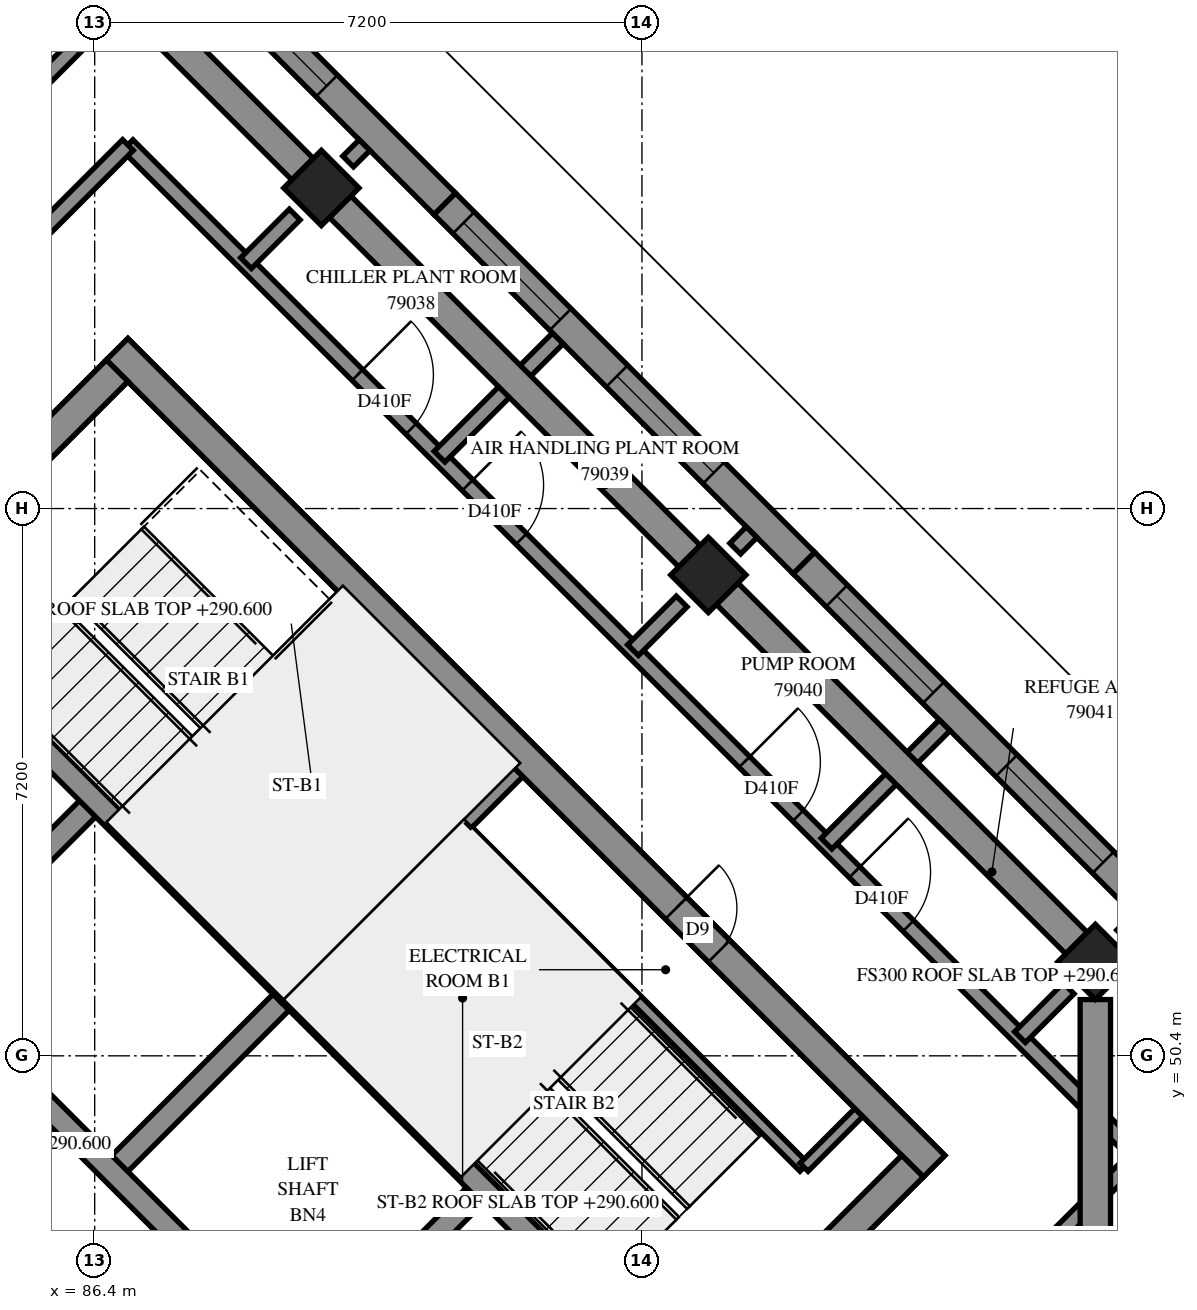
"""IFC4 building model, lengths in metres.
Left out: names, types, materials, properties, quantities, classifications, styles, units other than length and angle.
Written with IfcOpenShell. Run it as: python <this file> out.ifc"""

import sys

from ifc_helpers import new_model, si_unit, direction, frame, frame_2d, origin, origin_2d, place, context, subcontext, project, spatial, polyline, rectangle, outline, extrude, element, fill, save


model = new_model("IFC4")
c1 = context("Model", 3, precision=1e-05, world=origin(), true_north=direction((0.0, 1.0)))
c2 = subcontext(c1, "Body", "Model", "MODEL_VIEW")
j1 = project(units=[si_unit("LENGTHUNIT", "METRE"), si_unit("PLANEANGLEUNIT", "RADIAN")], contexts=[c1])
p1 = place(None, origin())
s1 = spatial("IfcSite", under=j1, at=p1, CompositionType="ELEMENT")
p2 = place(p1, origin())
s2 = spatial("IfcBuilding", under=s1, at=p2, CompositionType="ELEMENT")
p3 = place(p2, frame((0.0, 0.0, 290.6)))
s3 = spatial("IfcBuildingStorey", under=s2, at=p3, CompositionType="ELEMENT", Elevation=290.6)
for number, where, z_axis, x_axis in (
    (1, (89.382, 61.818, 0.0), (0.0, 0.0, 1.0), (0.707, -0.707, 0.0)),
    (2, (94.474, 56.727, 0.0), (0.0, 0.0, 1.0), (0.707, -0.707, 0.0)),
    (3, (99.565, 51.635, 0.0), (0.0, 0.0, 1.0), (0.707, -0.707, 0.0)),
):
    element("IfcColumn", number, at=place(p3, frame(where, z_axis=z_axis, x_axis=x_axis)), inside=s3, PredefinedType="COLUMN", context=c2, shape_type="SweptSolid", body=[
        extrude(rectangle(XDim=0.7, YDim=0.7, at=origin_2d()), origin(), (0.0, 0.0, 1.0), 3.5),
    ])
p4 = place(p3, frame((76.23, 49.231, -0.3), z_axis=(0.0, 0.0, 1.0), x_axis=(0.7071034917, -0.7071100706, 0.0)))
e4 = element("IfcWall", 4, at=p4, inside=s3, PredefinedType="SHEAR", context=c2, shape_type="SweptSolid", body=[
    extrude(rectangle(XDim=15.2, YDim=0.4, at=frame_2d((7.6, 0.0))), origin(), (0.0, 0.0, 1.0), 3.1),
])
p5 = place(p3, frame((86.695, 59.696, -0.3), z_axis=(0.0, 0.0, 1.0), x_axis=(0.7071100706, -0.7071034917, 0.0)))
e5 = element("IfcWall", 5, at=p5, inside=s3, PredefinedType="SHEAR", context=c2, shape_type="SweptSolid", body=[
    extrude(rectangle(XDim=15.2, YDim=0.4, at=frame_2d((7.6, 0.0))), origin(), (0.0, 0.0, 1.0), 3.1),
])
p6 = place(p5, frame((10.4, 0.0, 0.3)))
e6 = element("IfcOpeningElement", 6, at=p6, cuts=e5, PredefinedType="OPENING", context=c2, shape_type="SweptSolid", body=[
    extrude(rectangle(XDim=0.8, YDim=2.1, at=frame_2d((0.4, 1.05))), frame((0.0, 0.21, 0.0), z_axis=(0.0, -1.0, 0.0), x_axis=(1.0, 0.0, 0.0)), (0.0, 0.0, 1.0), 0.42),
])
p7 = place(p3, frame((76.513, 49.231, -0.3), z_axis=(0.0, 0.0, 1.0), x_axis=(0.7071067812, 0.7071067812, 0.0)))
e7 = element("IfcWall", 7, at=p7, inside=s3, PredefinedType="SHEAR", context=c2, shape_type="SweptSolid", body=[
    extrude(rectangle(XDim=14.4, YDim=0.4, at=frame_2d((7.2, 0.0))), origin(), (0.0, 0.0, 1.0), 3.1),
])
p8 = place(p7, frame((4.55, 0.0, 0.3)))
e8 = element("IfcOpeningElement", 8, at=p8, cuts=e7, PredefinedType="OPENING", context=c2, shape_type="SweptSolid", body=[
    extrude(rectangle(XDim=1.1, YDim=2.1, at=frame_2d((0.55, 1.05))), frame((0.0, 0.21, 0.0), z_axis=(0.0, -1.0, 0.0), x_axis=(1.0, 0.0, 0.0)), (0.0, 0.0, 1.0), 0.42),
])
p9 = place(p7, frame((11.35, 0.0, 0.3)))
e9 = element("IfcOpeningElement", 9, at=p9, cuts=e7, PredefinedType="OPENING", context=c2, shape_type="SweptSolid", body=[
    extrude(rectangle(XDim=1.1, YDim=2.1, at=frame_2d((0.55, 1.05))), frame((0.0, 0.21, 0.0), z_axis=(0.0, -1.0, 0.0), x_axis=(1.0, 0.0, 0.0)), (0.0, 0.0, 1.0), 0.42),
])
p10 = place(p3, frame((86.978, 38.766, -0.3), z_axis=(0.0, 0.0, 1.0), x_axis=(0.7071067812, 0.7071067812, 0.0)))
e10 = element("IfcWall", 10, at=p10, inside=s3, PredefinedType="SHEAR", context=c2, shape_type="SweptSolid", body=[
    extrude(rectangle(XDim=14.4, YDim=0.4, at=frame_2d((7.2, 0.0))), origin(), (0.0, 0.0, 1.0), 3.1),
])
p11 = place(p10, frame((4.55, 0.0, 0.3)))
e11 = element("IfcOpeningElement", 11, at=p11, cuts=e10, PredefinedType="OPENING", context=c2, shape_type="SweptSolid", body=[
    extrude(rectangle(XDim=1.1, YDim=2.1, at=frame_2d((0.55, 1.05))), frame((0.0, 0.21, 0.0), z_axis=(0.0, -1.0, 0.0), x_axis=(1.0, 0.0, 0.0)), (0.0, 0.0, 1.0), 0.42),
])
p12 = place(p10, frame((11.35, 0.0, 0.3)))
e12 = element("IfcOpeningElement", 12, at=p12, cuts=e10, PredefinedType="OPENING", context=c2, shape_type="SweptSolid", body=[
    extrude(rectangle(XDim=1.1, YDim=2.1, at=frame_2d((0.55, 1.05))), frame((0.0, 0.21, 0.0), z_axis=(0.0, -1.0, 0.0), x_axis=(1.0, 0.0, 0.0)), (0.0, 0.0, 1.0), 0.42),
])
p13 = place(p3, frame((84.079, 51.423, 0.0), z_axis=(0.0, 0.0, 1.0), x_axis=(0.7071219326, 0.7070916295, 0.0)))
e13 = element("IfcWall", 13, at=p13, inside=s3, PredefinedType="SOLIDWALL", context=c2, shape_type="SweptSolid", body=[
    extrude(rectangle(XDim=3.3, YDim=0.3, at=frame_2d((1.65, 0.0))), origin(), (0.0, 0.0, 1.0), 3.5),
])
for number, where, z_axis, x_axis in (
    (14, (86.625, 48.878, 0.0), (0.0, 0.0, 1.0), (0.707, 0.707, 0.0)),
    (15, (89.17, 46.332, 0.0), (0.0, 0.0, 1.0), (0.707, 0.707, 0.0)),
):
    element("IfcWall", number, at=place(p3, frame(where, z_axis=z_axis, x_axis=x_axis)), inside=s3, PredefinedType="SOLIDWALL", context=c2, shape_type="SweptSolid", body=[
        extrude(rectangle(XDim=3.3, YDim=0.3, at=frame_2d((1.65, 0.0))), origin(), (0.0, 0.0, 1.0), 3.5),
    ])
p14 = place(p3, frame((78.988, 51.423, 0.0), z_axis=(0.0, 0.0, 1.0), x_axis=(0.7071067812, -0.7071067812, 0.0)))
e16 = element("IfcWall", 16, at=p14, inside=s3, PredefinedType="SOLIDWALL", context=c2, shape_type="SweptSolid", body=[
    extrude(rectangle(XDim=14.4, YDim=0.3, at=frame_2d((7.2, 0.0))), origin(), (0.0, 0.0, 1.0), 3.5),
])
p15 = place(p14, frame((12.05, 0.0, 0.0)))
e17 = element("IfcOpeningElement", 17, at=p15, cuts=e16, PredefinedType="OPENING", context=c2, shape_type="SweptSolid", body=[
    extrude(rectangle(XDim=1.1, YDim=2.1, at=frame_2d((0.55, 1.05))), frame((0.0, 0.16, 0.0), z_axis=(0.0, -1.0, 0.0), x_axis=(1.0, 0.0, 0.0)), (0.0, 0.0, 1.0), 0.32),
])
p16 = place(p3, frame((81.534, 53.969, 0.0), z_axis=(0.0, 0.0, 1.0), x_axis=(0.707103309, -0.7071102534, 0.0)))
e18 = element("IfcWall", 18, at=p16, inside=s3, PredefinedType="SOLIDWALL", context=c2, shape_type="SweptSolid", body=[
    extrude(rectangle(XDim=14.4, YDim=0.3, at=frame_2d((7.2, 0.0))), origin(), (0.0, 0.0, 1.0), 3.5),
])
p17 = place(p16, frame((12.05, 0.0, 0.0)))
e19 = element("IfcOpeningElement", 19, at=p17, cuts=e18, PredefinedType="OPENING", context=c2, shape_type="SweptSolid", body=[
    extrude(rectangle(XDim=1.1, YDim=2.1, at=frame_2d((0.55, 1.05))), frame((0.0, 0.16, 0.0), z_axis=(0.0, -1.0, 0.0), x_axis=(1.0, 0.0, 0.0)), (0.0, 0.0, 1.0), 0.32),
])
for number, where, z_axis, x_axis in (
    (20, (83.867, 56.302, 0.0), (0.0, 0.0, 1.0), (0.707, -0.707, 0.0)),
    (21, (88.958, 51.211, 0.0), (0.0, 0.0, 1.0), (0.707, -0.707, 0.0)),
):
    element("IfcWall", number, at=place(p3, frame(where, z_axis=z_axis, x_axis=x_axis)), inside=s3, PredefinedType="SOLIDWALL", context=c2, shape_type="SweptSolid", body=[
        extrude(rectangle(XDim=7.2, YDim=0.3, at=frame_2d((3.6, 0.0))), origin(), (0.0, 0.0, 1.0), 3.5),
    ])
p18 = place(p3, frame((88.958, 51.211, 0.0), z_axis=(0.0, 0.0, 1.0), x_axis=(0.7071067812, 0.7071067812, 0.0)))
e22 = element("IfcWall", 22, at=p18, inside=s3, PredefinedType="SOLIDWALL", context=c2, shape_type="SweptSolid", body=[
    extrude(rectangle(XDim=4.2, YDim=0.3, at=frame_2d((2.1, 0.0))), origin(), (0.0, 0.0, 1.0), 3.5),
])
p19 = place(p3, frame((99.282, 46.544, 0.0), z_axis=(0.0, 0.0, 1.0), x_axis=(0.7071067812, 0.7071067812, 0.0)))
e23 = element("IfcWall", 23, at=p19, inside=s3, PredefinedType="SOLIDWALL", context=c2, shape_type="SweptSolid", body=[
    extrude(outline(polyline([(0.2, -0.2), (6.23, -0.2), (5.657, 0.2), (-0.2, 0.2), (0.2, -0.2)])), origin(), (0.0, 0.0, 1.0), 3.5),
])
p20 = place(p19, frame((1.1, 0.0, 0.7)))
e24 = element("IfcOpeningElement", 24, at=p20, cuts=e23, PredefinedType="OPENING", context=c2, shape_type="SweptSolid", body=[
    extrude(rectangle(XDim=1.8, YDim=2.2, at=frame_2d((0.9, 1.1))), frame((0.0, 0.21, 0.0), z_axis=(0.0, -1.0, 0.0), x_axis=(1.0, 0.0, 0.0)), (0.0, 0.0, 1.0), 0.42),
])
p21 = place(p3, frame((100.48, 52.134, 0.0), z_axis=(0.0, 0.0, 1.0), x_axis=(-0.7071067812, 0.7071067812, 0.0)))
e25 = element("IfcWall", 25, at=p21, inside=s3, PredefinedType="SOLIDWALL", context=c2, shape_type="SweptSolid", body=[
    extrude(outline(polyline([(0.036, -0.2), (6.718, -0.2), (6.718, 0.2), (-0.036, 0.2), (0.036, -0.2)])), origin(), (0.0, 0.0, 1.0), 3.5),
])
p22 = place(p21, frame((1.147, 0.0, 0.7)))
e26 = element("IfcOpeningElement", 26, at=p22, cuts=e25, PredefinedType="OPENING", context=c2, shape_type="SweptSolid", body=[
    extrude(rectangle(XDim=1.8, YDim=2.2, at=frame_2d((0.9, 1.1))), frame((0.0, 0.21, 0.0), z_axis=(0.0, -1.0, 0.0), x_axis=(1.0, 0.0, 0.0)), (0.0, 0.0, 1.0), 0.42),
])
p23 = place(p21, frame((4.306, 0.0, 0.7)))
e27 = element("IfcOpeningElement", 27, at=p23, cuts=e25, PredefinedType="OPENING", context=c2, shape_type="SweptSolid", body=[
    extrude(rectangle(XDim=1.8, YDim=2.2, at=frame_2d((0.9, 1.1))), frame((0.0, 0.21, 0.0), z_axis=(0.0, -1.0, 0.0), x_axis=(1.0, 0.0, 0.0)), (0.0, 0.0, 1.0), 0.42),
])
p24 = place(p3, frame((95.73, 56.884, 0.0), z_axis=(0.0, 0.0, 1.0), x_axis=(-0.7071067812, 0.7071067812, 0.0)))
e28 = element("IfcWall", 28, at=p24, inside=s3, PredefinedType="SOLIDWALL", context=c2, shape_type="SweptSolid", body=[
    extrude(outline(polyline([(0.0, -0.2), (6.682, -0.2), (6.682, 0.2), (0.0, 0.2), (0.0, -0.2)])), origin(), (0.0, 0.0, 1.0), 3.5),
])
p25 = place(p24, frame((1.677, 0.0, 0.7)))
e29 = element("IfcOpeningElement", 29, at=p25, cuts=e28, PredefinedType="OPENING", context=c2, shape_type="SweptSolid", body=[
    extrude(rectangle(XDim=1.8, YDim=2.2, at=frame_2d((0.9, 1.1))), frame((0.0, 0.21, 0.0), z_axis=(0.0, -1.0, 0.0), x_axis=(1.0, 0.0, 0.0)), (0.0, 0.0, 1.0), 0.42),
])
p26 = place(p24, frame((4.529, 0.0, 0.7)))
e30 = element("IfcOpeningElement", 30, at=p26, cuts=e28, PredefinedType="OPENING", context=c2, shape_type="SweptSolid", body=[
    extrude(rectangle(XDim=1.8, YDim=2.2, at=frame_2d((0.9, 1.1))), frame((0.0, 0.21, 0.0), z_axis=(0.0, -1.0, 0.0), x_axis=(1.0, 0.0, 0.0)), (0.0, 0.0, 1.0), 0.42),
])
p27 = place(p3, frame((91.005, 61.609, 0.0), z_axis=(0.0, 0.0, 1.0), x_axis=(-0.7071142638, 0.7070992985, 0.0)))
e31 = element("IfcWall", 31, at=p27, inside=s3, PredefinedType="SOLIDWALL", context=c2, shape_type="SweptSolid", body=[
    extrude(outline(polyline([(0.0, -0.2), (6.682, -0.2), (6.682, 0.2), (0.0, 0.2), (0.0, -0.2)])), origin(), (0.0, 0.0, 1.0), 3.5),
])
p28 = place(p27, frame((2.195, 0.0, 0.7)))
e32 = element("IfcOpeningElement", 32, at=p28, cuts=e31, PredefinedType="OPENING", context=c2, shape_type="SweptSolid", body=[
    extrude(rectangle(XDim=1.8, YDim=2.2, at=frame_2d((0.9, 1.1))), frame((0.0, 0.21, 0.0), z_axis=(0.0, -1.0, 0.0), x_axis=(1.0, 0.0, 0.0)), (0.0, 0.0, 1.0), 0.42),
])
p29 = place(p3, frame((91.313, 53.354, 0.0), z_axis=(0.0, 0.0, 1.0), x_axis=(0.7071147811, -0.7070987812, 0.0)))
e33 = element("IfcWall", 33, at=p29, inside=s3, PredefinedType="PARTITIONING", context=c2, shape_type="SweptSolid", body=[
    extrude(rectangle(XDim=6.25, YDim=0.15, at=frame_2d((3.125, 0.0))), origin(), (0.0, 0.0, 1.0), 3.5),
])
p30 = place(p3, frame((95.732, 48.934, 0.0), z_axis=(0.0, 0.0, 1.0), x_axis=(0.7071067812, 0.7071067812, 0.0)))
e34 = element("IfcWall", 34, at=p30, inside=s3, PredefinedType="PARTITIONING", context=c2, shape_type="SweptSolid", body=[
    extrude(rectangle(XDim=1.02, YDim=0.15, at=frame_2d((0.51, 0.0))), origin(), (0.0, 0.0, 1.0), 3.5),
])
p31 = place(p3, frame((86.833, 62.381, 0.0), z_axis=(0.0, 0.0, 1.0), x_axis=(0.7071067812, -0.7071067812, 0.0)))
e35 = element("IfcWall", 35, at=p31, inside=s3, PredefinedType="PARTITIONING", context=c2, shape_type="SweptSolid", body=[
    extrude(rectangle(XDim=18.801, YDim=0.2, at=frame_2d((9.4, 0.0))), origin(), (0.0, 0.0, 1.0), 3.5),
])
p32 = place(p31, frame((4.276, 0.0, 0.0)))
e36 = element("IfcOpeningElement", 36, at=p32, cuts=e35, PredefinedType="OPENING", context=c2, shape_type="SweptSolid", body=[
    extrude(rectangle(XDim=1.0, YDim=2.1, at=frame_2d((0.5, 1.05))), frame((0.0, 0.11, 0.0), z_axis=(0.0, -1.0, 0.0), x_axis=(1.0, 0.0, 0.0)), (0.0, 0.0, 1.0), 0.22),
])
p33 = place(p31, frame((6.326, 0.0, 0.0)))
e37 = element("IfcOpeningElement", 37, at=p33, cuts=e35, PredefinedType="OPENING", context=c2, shape_type="SweptSolid", body=[
    extrude(rectangle(XDim=1.0, YDim=2.1, at=frame_2d((0.5, 1.05))), frame((0.0, 0.11, 0.0), z_axis=(0.0, -1.0, 0.0), x_axis=(1.0, 0.0, 0.0)), (0.0, 0.0, 1.0), 0.22),
])
p34 = place(p31, frame((11.476, 0.0, 0.0)))
e38 = element("IfcOpeningElement", 38, at=p34, cuts=e35, PredefinedType="OPENING", context=c2, shape_type="SweptSolid", body=[
    extrude(rectangle(XDim=1.0, YDim=2.1, at=frame_2d((0.5, 1.05))), frame((0.0, 0.11, 0.0), z_axis=(0.0, -1.0, 0.0), x_axis=(1.0, 0.0, 0.0)), (0.0, 0.0, 1.0), 0.22),
])
p35 = place(p31, frame((13.526, 0.0, 0.0)))
e39 = element("IfcOpeningElement", 39, at=p35, cuts=e35, PredefinedType="OPENING", context=c2, shape_type="SweptSolid", body=[
    extrude(rectangle(XDim=1.0, YDim=2.1, at=frame_2d((0.5, 1.05))), frame((0.0, 0.11, 0.0), z_axis=(0.0, -1.0, 0.0), x_axis=(1.0, 0.0, 0.0)), (0.0, 0.0, 1.0), 0.22),
])
p36 = place(p3, frame((94.12, 43.081, 0.0), z_axis=(0.0, 0.0, 1.0), x_axis=(0.7071067812, 0.7071067812, 0.0)))
e40 = element("IfcWall", 40, at=p36, inside=s3, PredefinedType="PARTITIONING", context=c2, shape_type="SweptSolid", body=[
    extrude(rectangle(XDim=8.499, YDim=0.2, at=frame_2d((4.25, 0.0))), origin(), (0.0, 0.0, 1.0), 3.5),
])
p37 = place(p3, frame((80.83, 56.372, 0.0), z_axis=(0.0, 0.0, 1.0), x_axis=(0.7069890968, 0.707224446, 0.0)))
e41 = element("IfcWall", 41, at=p37, inside=s3, PredefinedType="PARTITIONING", context=c2, shape_type="SweptSolid", body=[
    extrude(rectangle(XDim=8.498, YDim=0.2, at=frame_2d((4.249, 0.0))), origin(), (0.0, 0.0, 1.0), 3.5),
])
p38 = place(p37, frame((0.841, 0.0, 0.0)))
e42 = element("IfcOpeningElement", 42, at=p38, cuts=e41, PredefinedType="OPENING", context=c2, shape_type="SweptSolid", body=[
    extrude(rectangle(XDim=1.0, YDim=2.1, at=frame_2d((0.5, 1.05))), frame((0.0, 0.11, 0.0), z_axis=(0.0, -1.0, 0.0), x_axis=(1.0, 0.0, 0.0)), (0.0, 0.0, 1.0), 0.22),
])
for number, where, z_axis, x_axis in (
    (43, (98.574, 50.646, 0.0), (0.0, 0.0, 1.0), (0.707, 0.707, 0.0)),
    (44, (88.391, 60.828, 0.0), (0.0, 0.0, 1.0), (0.707, 0.707, 0.0)),
    (45, (93.483, 55.737, 0.0), (0.0, 0.0, 1.0), (0.707, 0.707, 0.0)),
):
    element("IfcWall", number, at=place(p3, frame(where, z_axis=z_axis, x_axis=x_axis)), inside=s3, PredefinedType="PARTITIONING", context=c2, shape_type="SweptSolid", body=[
        extrude(rectangle(XDim=0.905, YDim=0.2, at=frame_2d((0.453, 0.0))), origin(), (0.0, 0.0, 1.0), 3.5),
    ])
p39 = place(p3, frame((80.799, 58.327, 0.0), z_axis=(0.0, 0.0, 1.0), x_axis=(0.7071067812, 0.7071067812, 0.0)))
e46 = element("IfcWall", 46, at=p39, inside=s3, PredefinedType="PARTITIONING", context=c2, shape_type="SweptSolid", body=[
    extrude(outline(polyline([(0.0, -0.1), (9.338, -0.1), (9.338, 0.1), (0.0, 0.1), (0.0, -0.1)])), origin(), (0.0, 0.0, 1.0), 3.5),
])
for number, where, z_axis, x_axis in (
    (47, (96.028, 53.192, 0.0), (0.0, 0.0, 1.0), (0.707, 0.708, 0.0)),
    (48, (90.937, 58.283, 0.0), (0.0, 0.0, 1.0), (0.707, 0.707, 0.0)),
):
    element("IfcWall", number, at=place(p3, frame(where, z_axis=z_axis, x_axis=x_axis)), inside=s3, PredefinedType="PARTITIONING", context=c2, shape_type="SweptSolid", body=[
        extrude(outline(polyline([(0.0, -0.1), (2.2, -0.1), (2.2, 0.1), (0.0, 0.1), (0.0, -0.1)])), origin(), (0.0, 0.0, 1.0), 3.5),
    ])
p40 = place(p3, frame((99.917, 51.983, 0.0), z_axis=(0.0, 0.0, 1.0), x_axis=(0.7087439748, 0.7054657881, 0.0)))
e49 = element("IfcWall", 49, at=p40, inside=s3, PredefinedType="PARTITIONING", context=c2, shape_type="SweptSolid", body=[
    extrude(outline(polyline([(0.0, -0.1), (0.305, -0.1), (0.305, 0.1), (0.0, 0.1), (0.0, -0.1)])), origin(), (0.0, 0.0, 1.0), 3.5),
])
p41 = place(p3, frame((94.827, 57.073, 0.0), z_axis=(0.0, 0.0, 1.0), x_axis=(0.7053010617, 0.7089079012, 0.0)))
e50 = element("IfcWall", 50, at=p41, inside=s3, PredefinedType="PARTITIONING", context=c2, shape_type="SweptSolid", body=[
    extrude(outline(polyline([(0.0, -0.1), (0.305, -0.1), (0.305, 0.1), (0.0, 0.1), (0.0, -0.1)])), origin(), (0.0, 0.0, 1.0), 3.5),
])
p42 = place(p3, frame((89.734, 62.166, 0.0), z_axis=(0.0, 0.0, 1.0), x_axis=(0.7089070674, 0.7053018997, 0.0)))
e51 = element("IfcWall", 51, at=p42, inside=s3, PredefinedType="PARTITIONING", context=c2, shape_type="SweptSolid", body=[
    extrude(outline(polyline([(0.0, -0.1), (0.305, -0.1), (0.305, 0.1), (0.0, 0.1), (0.0, -0.1)])), origin(), (0.0, 0.0, 1.0), 3.5),
])
p43 = place(p22, origin())
e52 = element("IfcWindow", 52, at=p43, inside=s3, PartitioningType="SINGLE_PANEL", PredefinedType="WINDOW", context=c2, shape_type="SweptSolid", body=[
    extrude(rectangle(XDim=1.8, YDim=2.2, at=frame_2d((0.9, 1.1))), frame((0.0, 0.08, 0.0), z_axis=(0.0, -1.0, 0.0), x_axis=(1.0, 0.0, 0.0)), (0.0, 0.0, 1.0), 0.06),
])
fill(e26, e52)
p44 = place(p23, origin())
e53 = element("IfcWindow", 53, at=p44, inside=s3, PartitioningType="SINGLE_PANEL", PredefinedType="WINDOW", context=c2, shape_type="SweptSolid", body=[
    extrude(rectangle(XDim=1.8, YDim=2.2, at=frame_2d((0.9, 1.1))), frame((0.0, 0.08, 0.0), z_axis=(0.0, -1.0, 0.0), x_axis=(1.0, 0.0, 0.0)), (0.0, 0.0, 1.0), 0.06),
])
fill(e27, e53)
p45 = place(p25, origin())
e54 = element("IfcWindow", 54, at=p45, inside=s3, PartitioningType="SINGLE_PANEL", PredefinedType="WINDOW", context=c2, shape_type="SweptSolid", body=[
    extrude(rectangle(XDim=1.8, YDim=2.2, at=frame_2d((0.9, 1.1))), frame((0.0, 0.08, 0.0), z_axis=(0.0, -1.0, 0.0), x_axis=(1.0, 0.0, 0.0)), (0.0, 0.0, 1.0), 0.06),
])
fill(e29, e54)
p46 = place(p26, origin())
e55 = element("IfcWindow", 55, at=p46, inside=s3, PartitioningType="SINGLE_PANEL", PredefinedType="WINDOW", context=c2, shape_type="SweptSolid", body=[
    extrude(rectangle(XDim=1.8, YDim=2.2, at=frame_2d((0.9, 1.1))), frame((0.0, 0.08, 0.0), z_axis=(0.0, -1.0, 0.0), x_axis=(1.0, 0.0, 0.0)), (0.0, 0.0, 1.0), 0.06),
])
fill(e30, e55)
p47 = place(p28, origin())
e56 = element("IfcWindow", 56, at=p47, inside=s3, PartitioningType="SINGLE_PANEL", PredefinedType="WINDOW", context=c2, shape_type="SweptSolid", body=[
    extrude(rectangle(XDim=1.8, YDim=2.2, at=frame_2d((0.9, 1.1))), frame((0.0, 0.08, 0.0), z_axis=(0.0, -1.0, 0.0), x_axis=(1.0, 0.0, 0.0)), (0.0, 0.0, 1.0), 0.06),
])
fill(e32, e56)
p48 = place(p6, origin())
e57 = element("IfcDoor", 57, at=p48, inside=s3, OperationType="SINGLE_SWING_RIGHT", PredefinedType="DOOR", context=c2, shape_type="SweptSolid", body=[
    extrude(rectangle(XDim=0.8, YDim=2.1, at=frame_2d((0.4, 1.05))), frame((0.0, 0.025, 0.0), z_axis=(0.0, -1.0, 0.0), x_axis=(1.0, 0.0, 0.0)), (0.0, 0.0, 1.0), 0.05),
])
fill(e6, e57)
p49 = place(p32, origin())
e58 = element("IfcDoor", 58, at=p49, inside=s3, OperationType="SINGLE_SWING_LEFT", PredefinedType="DOOR", context=c2, shape_type="SweptSolid", body=[
    extrude(rectangle(XDim=1.0, YDim=2.1, at=frame_2d((0.5, 1.05))), frame((0.0, 0.025, 0.0), z_axis=(0.0, -1.0, 0.0), x_axis=(1.0, 0.0, 0.0)), (0.0, 0.0, 1.0), 0.05),
])
fill(e36, e58)
p50 = place(p33, origin())
e59 = element("IfcDoor", 59, at=p50, inside=s3, OperationType="SINGLE_SWING_RIGHT", PredefinedType="DOOR", context=c2, shape_type="SweptSolid", body=[
    extrude(rectangle(XDim=1.0, YDim=2.1, at=frame_2d((0.5, 1.05))), frame((0.0, 0.025, 0.0), z_axis=(0.0, -1.0, 0.0), x_axis=(1.0, 0.0, 0.0)), (0.0, 0.0, 1.0), 0.05),
])
fill(e37, e59)
p51 = place(p34, origin())
e60 = element("IfcDoor", 60, at=p51, inside=s3, OperationType="SINGLE_SWING_LEFT", PredefinedType="DOOR", context=c2, shape_type="SweptSolid", body=[
    extrude(rectangle(XDim=1.0, YDim=2.1, at=frame_2d((0.5, 1.05))), frame((0.0, 0.025, 0.0), z_axis=(0.0, -1.0, 0.0), x_axis=(1.0, 0.0, 0.0)), (0.0, 0.0, 1.0), 0.05),
])
fill(e38, e60)
p52 = place(p35, origin())
e61 = element("IfcDoor", 61, at=p52, inside=s3, OperationType="SINGLE_SWING_RIGHT", PredefinedType="DOOR", context=c2, shape_type="SweptSolid", body=[
    extrude(rectangle(XDim=1.0, YDim=2.1, at=frame_2d((0.5, 1.05))), frame((0.0, 0.025, 0.0), z_axis=(0.0, -1.0, 0.0), x_axis=(1.0, 0.0, 0.0)), (0.0, 0.0, 1.0), 0.05),
])
fill(e39, e61)
save(model, sys.argv[1])
